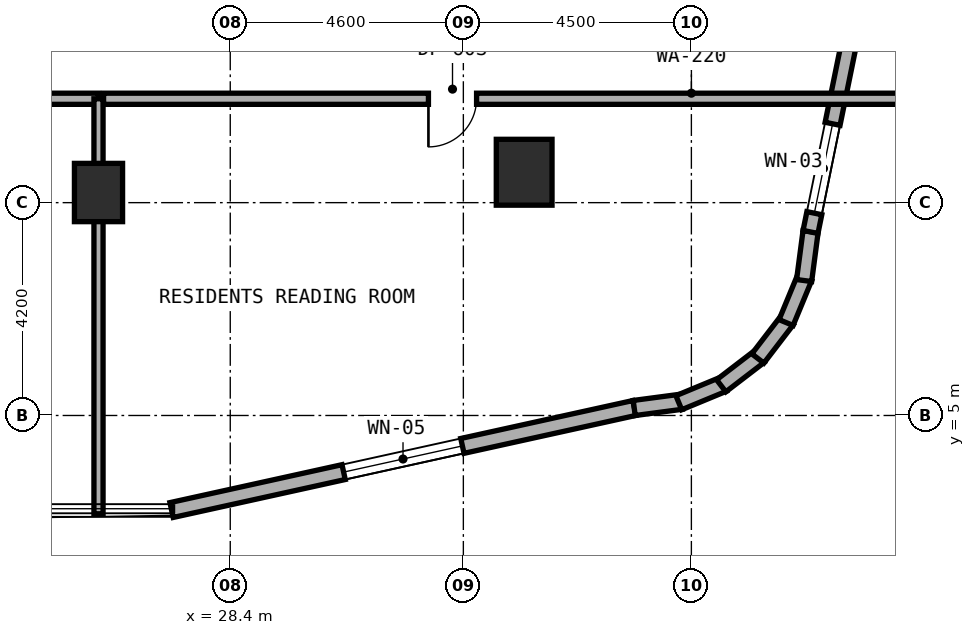
"""IFC4 building model, lengths in metres.
Left out: names, types, materials, properties, quantities, classifications, styles, units other than length and angle.
Written with IfcOpenShell. Run it as: python <this file> out.ifc"""

import sys

from ifc_helpers import new_model, si_unit, direction, frame, frame_2d, origin, origin_2d, place, context, subcontext, project, spatial, rectangle, extrude, element, fill, save


model = new_model("IFC4")
c1 = context("Model", 3, precision=1e-05, world=origin(), true_north=direction((0.0, 1.0)))
c2 = subcontext(c1, "Body", "Model", "MODEL_VIEW")
j1 = project(units=[si_unit("LENGTHUNIT", "METRE"), si_unit("PLANEANGLEUNIT", "RADIAN")], contexts=[c1])
p1 = place(None, origin())
s1 = spatial("IfcSite", under=j1, at=p1, CompositionType="ELEMENT")
p2 = place(p1, origin())
s2 = spatial("IfcBuilding", under=s1, at=p2, CompositionType="ELEMENT")
p3 = place(p2, frame((0.0, 0.0, 45.0)))
s3 = spatial("IfcBuildingStorey", under=s2, at=p3, CompositionType="ELEMENT", Elevation=45.0)
p4 = place(p3, frame((25.8, 9.4, 0.0), z_axis=(0.0, 0.0, 1.0), x_axis=(1.0, 0.0, 0.0)))
e1 = element("IfcColumn", 1, at=p4, inside=s3, PredefinedType="COLUMN", context=c2, shape_type="SweptSolid", body=[
    extrude(rectangle(XDim=0.95, YDim=1.15, at=origin_2d()), origin(), (0.0, 0.0, 1.0), 3.5),
])
p5 = place(p3, frame((34.2, 9.8, 0.0), z_axis=(0.0, 0.0, 1.0), x_axis=(1.0, 0.0, 0.0)))
e2 = element("IfcColumn", 2, at=p5, inside=s3, PredefinedType="COLUMN", context=c2, shape_type="SweptSolid", body=[
    extrude(rectangle(XDim=1.1, YDim=1.3, at=origin_2d()), origin(), (0.0, 0.0, 1.0), 3.5),
])
p6 = place(p3, frame((27.242, 3.134, 0.0), z_axis=(0.0, 0.0, 1.0), x_axis=(0.97654500432, 0.215313386808, 0.0)))
e3 = element("IfcWall", 3, at=p6, inside=s3, PredefinedType="STANDARD", context=c2, shape_type="SweptSolid", body=[
    extrude(rectangle(XDim=9.354, YDim=0.3, at=frame_2d((4.677, 0.0))), origin(), (0.0, 0.0, 1.0), 3.22),
])
p7 = place(p6, frame((3.477, 0.0, 0.8)))
e4 = element("IfcOpeningElement", 4, at=p7, cuts=e3, PredefinedType="OPENING", context=c2, shape_type="SweptSolid", body=[
    extrude(rectangle(XDim=2.4, YDim=1.6, at=frame_2d((1.2, 0.8))), frame((0.0, 0.16, 0.0), z_axis=(0.0, -1.0, 0.0), x_axis=(1.0, 0.0, 0.0)), (0.0, 0.0, 1.0), 0.32),
])
p8 = place(p3, frame((36.372, 5.148, 0.0), z_axis=(0.0, 0.0, 1.0), x_axis=(0.991359246108, 0.131174864804, 0.0)))
e5 = element("IfcWall", 5, at=p8, inside=s3, PredefinedType="STANDARD", context=c2, shape_type="SweptSolid", body=[
    extrude(rectangle(XDim=0.938, YDim=0.3, at=frame_2d((0.469, 0.0))), origin(), (0.0, 0.0, 1.0), 3.22),
])
p9 = place(p3, frame((37.252, 5.252, 0.0), z_axis=(0.0, 0.0, 1.0), x_axis=(0.924019948111, 0.382344263057, 0.0)))
e6 = element("IfcWall", 6, at=p9, inside=s3, PredefinedType="STANDARD", context=c2, shape_type="SweptSolid", body=[
    extrude(rectangle(XDim=0.955, YDim=0.3, at=frame_2d((0.477, 0.0))), origin(), (0.0, 0.0, 1.0), 3.22),
])
p10 = place(p3, frame((38.089, 5.586, 0.0), z_axis=(0.0, 0.0, 1.0), x_axis=(0.793573440799, 0.608474481025, 0.0)))
e7 = element("IfcWall", 7, at=p10, inside=s3, PredefinedType="STANDARD", context=c2, shape_type="SweptSolid", body=[
    extrude(rectangle(XDim=0.955, YDim=0.3, at=frame_2d((0.478, 0.0))), origin(), (0.0, 0.0, 1.0), 3.22),
])
p11 = place(p3, frame((38.812, 6.125, 0.0), z_axis=(0.0, 0.0, 1.0), x_axis=(0.608351047625, 0.793668068435, 0.0)))
e8 = element("IfcWall", 8, at=p11, inside=s3, PredefinedType="STANDARD", context=c2, shape_type="SweptSolid", body=[
    extrude(rectangle(XDim=0.955, YDim=0.3, at=frame_2d((0.478, 0.0))), origin(), (0.0, 0.0, 1.0), 3.22),
])
p12 = place(p3, frame((39.369, 6.834, 0.0), z_axis=(0.0, 0.0, 1.0), x_axis=(0.382344263057, 0.924019948111, 0.0)))
e9 = element("IfcWall", 9, at=p12, inside=s3, PredefinedType="STANDARD", context=c2, shape_type="SweptSolid", body=[
    extrude(rectangle(XDim=0.955, YDim=0.3, at=frame_2d((0.477, 0.0))), origin(), (0.0, 0.0, 1.0), 3.22),
])
p13 = place(p3, frame((39.725, 7.663, 0.0), z_axis=(0.0, 0.0, 1.0), x_axis=(0.130454512571, 0.991454295543, 0.0)))
e10 = element("IfcWall", 10, at=p13, inside=s3, PredefinedType="STANDARD", context=c2, shape_type="SweptSolid", body=[
    extrude(rectangle(XDim=0.973, YDim=0.3, at=frame_2d((0.487, 0.0))), origin(), (0.0, 0.0, 1.0), 3.22),
])
p14 = place(p3, frame((39.851, 8.622, 0.0), z_axis=(0.0, 0.0, 1.0), x_axis=(0.199990901713, 0.979797754249, 0.0)))
e11 = element("IfcWall", 11, at=p14, inside=s3, PredefinedType="STANDARD", context=c2, shape_type="SweptSolid", body=[
    extrude(rectangle(XDim=10.065, YDim=0.3, at=frame_2d((5.033, 0.0))), origin(), (0.0, 0.0, 1.0), 3.22),
])
p15 = place(p14, frame((0.378, 0.0, 0.85)))
e12 = element("IfcOpeningElement", 12, at=p15, cuts=e11, PredefinedType="OPENING", context=c2, shape_type="SweptSolid", body=[
    extrude(rectangle(XDim=1.8, YDim=1.5, at=frame_2d((0.9, 0.75))), frame((0.0, 0.16, 0.0), z_axis=(0.0, -1.0, 0.0), x_axis=(1.0, 0.0, 0.0)), (0.0, 0.0, 1.0), 0.32),
])
p16 = place(p14, frame((5.236, 0.0, 0.8)))
e13 = element("IfcOpeningElement", 13, at=p16, cuts=e11, PredefinedType="OPENING", context=c2, shape_type="SweptSolid", body=[
    extrude(rectangle(XDim=2.4, YDim=1.6, at=frame_2d((1.2, 0.8))), frame((0.0, 0.16, 0.0), z_axis=(0.0, -1.0, 0.0), x_axis=(1.0, 0.0, 0.0)), (0.0, 0.0, 1.0), 0.32),
])
p17 = place(p3, frame((13.8, 11.25, 0.0), z_axis=(0.0, 0.0, 1.0), x_axis=(1.0, 0.0, 0.0)))
e14 = element("IfcWall", 14, at=p17, inside=s3, PredefinedType="SOLIDWALL", context=c2, shape_type="SweptSolid", body=[
    extrude(rectangle(XDim=12.0, YDim=0.22, at=frame_2d((6.0, 0.0))), origin(), (0.0, 0.0, 1.0), 2.395),
])
p18 = place(p17, frame((5.525, 0.0, 0.0)))
e15 = element("IfcOpeningElement", 15, at=p18, cuts=e14, PredefinedType="OPENING", context=c2, shape_type="SweptSolid", body=[
    extrude(rectangle(XDim=0.95, YDim=2.1, at=frame_2d((0.475, 1.05))), frame((0.0, 0.12, 0.0), z_axis=(0.0, -1.0, 0.0), x_axis=(1.0, 0.0, 0.0)), (0.0, 0.0, 1.0), 0.24),
])
p19 = place(p3, frame((25.8, 3.06, 0.0), z_axis=(0.0, 0.0, 1.0), x_axis=(0.0, 1.0, 0.0)))
e16 = element("IfcWall", 16, at=p19, inside=s3, PredefinedType="SOLIDWALL", context=c2, shape_type="SweptSolid", body=[
    extrude(rectangle(XDim=8.19, YDim=0.18, at=frame_2d((4.095, 0.0))), origin(), (0.0, 0.0, 1.0), 2.395),
])
p20 = place(p3, frame((25.9, 11.25, 0.0), z_axis=(0.0, 0.0, 1.0), x_axis=(1.0, 0.0, 0.0)))
e17 = element("IfcWall", 17, at=p20, inside=s3, PredefinedType="SOLIDWALL", context=c2, shape_type="SweptSolid", body=[
    extrude(rectangle(XDim=15.84, YDim=0.22, at=frame_2d((7.92, 0.0))), origin(), (0.0, 0.0, 1.0), 2.395),
])
p21 = place(p20, frame((6.411, 0.0, 0.0)))
e18 = element("IfcOpeningElement", 18, at=p21, cuts=e17, PredefinedType="OPENING", context=c2, shape_type="SweptSolid", body=[
    extrude(rectangle(XDim=0.95, YDim=2.1, at=frame_2d((0.475, 1.05))), frame((0.0, 0.12, 0.0), z_axis=(0.0, -1.0, 0.0), x_axis=(1.0, 0.0, 0.0)), (0.0, 0.0, 1.0), 0.24),
])
p22 = place(p7, origin())
e19 = element("IfcWindow", 19, at=p22, inside=s3, PartitioningType="SINGLE_PANEL", PredefinedType="WINDOW", context=c2, shape_type="SweptSolid", body=[
    extrude(rectangle(XDim=2.4, YDim=1.6, at=frame_2d((1.2, 0.8))), frame((0.0, 0.03, 0.0), z_axis=(0.0, -1.0, 0.0), x_axis=(1.0, 0.0, 0.0)), (0.0, 0.0, 1.0), 0.06),
])
fill(e4, e19)
p23 = place(p15, origin())
e20 = element("IfcWindow", 20, at=p23, inside=s3, PartitioningType="SINGLE_PANEL", PredefinedType="WINDOW", context=c2, shape_type="SweptSolid", body=[
    extrude(rectangle(XDim=1.8, YDim=1.5, at=frame_2d((0.9, 0.75))), frame((0.0, 0.03, 0.0), z_axis=(0.0, -1.0, 0.0), x_axis=(1.0, 0.0, 0.0)), (0.0, 0.0, 1.0), 0.06),
])
fill(e12, e20)
p24 = place(p21, frame((0.95, 0.0, 0.0), z_axis=(0.0, 0.0, 1.0), x_axis=(-1.0, 0.0, 0.0)))
e21 = element("IfcDoor", 21, at=p24, inside=s3, OperationType="SINGLE_SWING_RIGHT", PredefinedType="DOOR", context=c2, shape_type="SweptSolid", body=[
    extrude(rectangle(XDim=0.95, YDim=2.1, at=frame_2d((0.475, 1.05))), frame((0.0, 0.025, 0.0), z_axis=(0.0, -1.0, 0.0), x_axis=(1.0, 0.0, 0.0)), (0.0, 0.0, 1.0), 0.05),
])
fill(e18, e21)
save(model, sys.argv[1])
